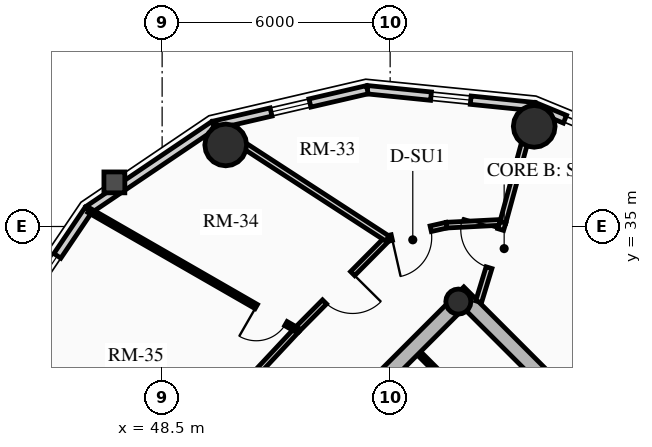
"""IFC4 building model, lengths in metres.
Left out: names, types, materials, properties, quantities, classifications, styles, units other than length and angle.
Written with IfcOpenShell. Run it as: python <this file> out.ifc"""

import sys

from ifc_helpers import new_model, si_unit, direction, frame, frame_2d, origin, origin_2d, place, context, subcontext, project, spatial, rectangle, circle, hollow_circle, extrude, source, transform, mapped, element, fill, save


model = new_model("IFC4")
c1 = context("Model", 3, precision=1e-05, world=origin(), true_north=direction((0.0, 1.0)))
c2 = subcontext(c1, "Body", "Model", "MODEL_VIEW")
j1 = project(units=[si_unit("LENGTHUNIT", "METRE"), si_unit("PLANEANGLEUNIT", "RADIAN")], contexts=[c1])
p1 = place(None, origin())
s1 = spatial("IfcSite", under=j1, at=p1, CompositionType="ELEMENT")
p2 = place(p1, origin())
s2 = spatial("IfcBuilding", under=s1, at=p2, CompositionType="ELEMENT")
p3 = place(p2, frame((0.0, 0.0, 211.21)))
s3 = spatial("IfcBuildingStorey", under=s2, at=p3, CompositionType="ELEMENT", Elevation=211.21)
p4 = place(p3, frame((66.268, 23.298, 0.0), z_axis=(0.0, 0.0, 1.0), x_axis=(-0.707106781187, 0.707106781187, 0.0)))
e1 = element("IfcWall", 1, at=p4, inside=s3, PredefinedType="SHEAR", context=c2, shape_type="SweptSolid", body=[
    extrude(rectangle(XDim=14.1, YDim=0.4, at=frame_2d((7.05, 0.0))), origin(), (0.0, 0.0, 1.0), 2.91),
])
p5 = place(p3, frame((48.873, 25.561, 0.0), z_axis=(0.0, 0.0, 1.0), x_axis=(0.707106781187, 0.707106781187, 0.0)))
e2 = element("IfcWall", 2, at=p5, inside=s3, PredefinedType="SHEAR", context=c2, shape_type="SweptSolid", body=[
    extrude(rectangle(XDim=10.7, YDim=0.4, at=frame_2d((5.35, 0.0))), origin(), (0.0, 0.0, 1.0), 2.91),
])
m1 = source(origin(), c2, "Body", "SweptSolid", [
    extrude(rectangle(XDim=1.5, YDim=2.02, at=frame_2d((0.75, 1.01))), frame((0.0, 0.21, 0.0), z_axis=(0.0, -1.0, 0.0), x_axis=(1.0, 0.0, 0.0)), (0.0, 0.0, 1.0), 0.42),
])
p6 = place(p5, frame((4.6, 0.0, 0.0)))
e3 = element("IfcOpeningElement", 3, at=p6, cuts=e2, PredefinedType="OPENING", context=c2, shape_type="MappedRepresentation", body=[
    mapped(m1, transform((0.0, 0.0, 0.0), x_axis=(1.0, 0.0, 0.0), y_axis=(0.0, 1.0, 0.0), z_axis=(0.0, 0.0, 1.0), scale=1.0)),
])
p7 = place(p3, frame((56.294, 33.024, 0.0), z_axis=(0.0, 0.0, 1.0), x_axis=(0.707106781187, 0.707106781187, 0.0)))
e4 = element("IfcColumn", 4, at=p7, inside=s3, PredefinedType="COLUMN", context=c2, shape_type="SweptSolid", body=[
    extrude(hollow_circle(Radius=0.33, WallThickness=0.025, at=origin_2d()), origin(), (0.0, 0.0, 1.0), 2.91),
])
for number, where, z_axis, x_axis in (
    (5, (58.291, 37.635, 0.0), (0.0, 0.0, 1.0), (1.0, 0.0, 0.0)),
    (6, (50.173, 37.146, 0.0), (0.0, 0.0, 1.0), (1.0, 0.0, 0.0)),
):
    element("IfcColumn", number, at=place(p3, frame(where, z_axis=z_axis, x_axis=x_axis)), inside=s3, PredefinedType="USERDEFINED", context=c2, shape_type="SweptSolid", body=[
        extrude(circle(Radius=0.55, at=origin_2d()), origin(), (0.0, 0.0, 1.0), 2.91),
    ])
p8 = place(p3, frame((58.295, 38.155, 0.0), z_axis=(0.0, 0.0, 1.0), x_axis=(0.924515260676, -0.381145028536, 0.0)))
e7 = element("IfcWall", 7, at=p8, inside=s3, PredefinedType="SOLIDWALL", context=c2, shape_type="SweptSolid", body=[
    extrude(rectangle(XDim=0.87, YDim=0.22, at=frame_2d((0.435, 0.0))), origin(), (0.0, 0.0, 1.0), 2.322),
])
p9 = place(p3, frame((53.9, 38.599, 0.0), z_axis=(0.0, 0.0, 1.0), x_axis=(0.994929930991, -0.100570534541, 0.0)))
e8 = element("IfcWall", 8, at=p9, inside=s3, PredefinedType="SOLIDWALL", context=c2, shape_type="SweptSolid", body=[
    extrude(rectangle(XDim=4.418, YDim=0.22, at=frame_2d((2.209, 0.0))), origin(), (0.0, 0.0, 1.0), 2.322),
])
m2 = source(origin(), c2, "Body", "SweptSolid", [
    extrude(rectangle(XDim=1.05, YDim=1.3, at=frame_2d((0.525, 0.65))), frame((0.0, 0.12, 0.0), z_axis=(0.0, -1.0, 0.0), x_axis=(1.0, 0.0, 0.0)), (0.0, 0.0, 1.0), 0.24),
])
p10 = place(p9, frame((1.684, 0.0, 0.65)))
e9 = element("IfcOpeningElement", 9, at=p10, cuts=e8, PredefinedType="OPENING", context=c2, shape_type="MappedRepresentation", body=[
    mapped(m2, transform((0.0, 0.0, 0.0), x_axis=(1.0, 0.0, 0.0), y_axis=(0.0, 1.0, 0.0), z_axis=(0.0, 0.0, 1.0), scale=1.0)),
])
p11 = place(p3, frame((49.856, 37.663, 0.0), z_axis=(0.0, 0.0, 1.0), x_axis=(0.974249228678, 0.225473813158, 0.0)))
e10 = element("IfcWall", 10, at=p11, inside=s3, PredefinedType="SOLIDWALL", context=c2, shape_type="SweptSolid", body=[
    extrude(rectangle(XDim=4.15, YDim=0.22, at=frame_2d((2.075, 0.0))), origin(), (0.0, 0.0, 1.0), 2.322),
])
p12 = place(p11, frame((1.55, 0.0, 0.65)))
e11 = element("IfcOpeningElement", 11, at=p12, cuts=e10, PredefinedType="OPENING", context=c2, shape_type="MappedRepresentation", body=[
    mapped(m2, transform((0.0, 0.0, 0.0), x_axis=(1.0, 0.0, 0.0), y_axis=(0.0, 1.0, 0.0), z_axis=(0.0, 0.0, 1.0), scale=1.0)),
])
p13 = place(p3, frame((46.561, 35.439, 0.0), z_axis=(0.0, 0.0, 1.0), x_axis=(0.828833723692, 0.559495003079, 0.0)))
e12 = element("IfcWall", 12, at=p13, inside=s3, PredefinedType="SOLIDWALL", context=c2, shape_type="SweptSolid", body=[
    extrude(rectangle(XDim=3.976, YDim=0.22, at=frame_2d((1.988, 0.0))), origin(), (0.0, 0.0, 1.0), 2.322),
])
p14 = place(p3, frame((44.337, 32.144, 0.0), z_axis=(0.0, 0.0, 1.0), x_axis=(0.559495003079, 0.828833723692, 0.0)))
e13 = element("IfcWall", 13, at=p14, inside=s3, PredefinedType="SOLIDWALL", context=c2, shape_type="SweptSolid", body=[
    extrude(rectangle(XDim=3.976, YDim=0.22, at=frame_2d((1.988, 0.0))), origin(), (0.0, 0.0, 1.0), 2.322),
])
p15 = place(p14, frame((1.463, 0.0, 0.65)))
e14 = element("IfcOpeningElement", 14, at=p15, cuts=e13, PredefinedType="OPENING", context=c2, shape_type="MappedRepresentation", body=[
    mapped(m2, transform((0.0, 0.0, 0.0), x_axis=(1.0, 0.0, 0.0), y_axis=(0.0, 1.0, 0.0), z_axis=(0.0, 0.0, 1.0), scale=1.0)),
])
p16 = place(p3, frame((57.981, 28.941, 0.0), z_axis=(0.0, 0.0, 1.0), x_axis=(-0.707074823725, 0.707138737204, 0.0)))
e15 = element("IfcWall", 15, at=p16, inside=s3, PredefinedType="PARTITIONING", context=c2, shape_type="SweptSolid", body=[
    extrude(rectangle(XDim=3.82, YDim=0.125, at=frame_2d((1.91, 0.0))), origin(), (0.0, 0.0, 1.0), 2.685),
])
m3 = source(origin(), c2, "Body", "SweptSolid", [
    extrude(rectangle(XDim=0.9, YDim=2.005, at=frame_2d((0.45, 1.002))), frame((0.0, 0.073, 0.0), z_axis=(0.0, -1.0, 0.0), x_axis=(1.0, 0.0, 0.0)), (0.0, 0.0, 1.0), 0.145),
])
p17 = place(p16, frame((1.45, 0.0, 0.0)))
e16 = element("IfcOpeningElement", 16, at=p17, cuts=e15, PredefinedType="OPENING", context=c2, shape_type="MappedRepresentation", body=[
    mapped(m3, transform((0.0, 0.0, 0.0), x_axis=(1.0, 0.0, 0.0), y_axis=(0.0, 1.0, 0.0), z_axis=(0.0, 0.0, 1.0), scale=1.0)),
])
p18 = place(p3, frame((57.467, 35.111, 0.0), z_axis=(0.0, 0.0, 1.0), x_axis=(-0.998691757323, -0.051134859488, 0.0)))
e17 = element("IfcWall", 17, at=p18, inside=s3, PredefinedType="PARTITIONING", context=c2, shape_type="SweptSolid", body=[
    extrude(rectangle(XDim=1.485, YDim=0.15, at=frame_2d((0.742, 0.0))), origin(), (0.0, 0.0, 1.0), 2.322),
])
p19 = place(p3, frame((55.984, 35.035, 0.0), z_axis=(0.0, 0.0, 1.0), x_axis=(-0.975290305708, -0.22092718165, 0.0)))
e18 = element("IfcWall", 18, at=p19, inside=s3, PredefinedType="PARTITIONING", context=c2, shape_type="SweptSolid", body=[
    extrude(rectangle(XDim=1.597, YDim=0.15, at=frame_2d((0.798, 0.0))), origin(), (0.0, 0.0, 1.0), 2.255),
])
m4 = source(origin(), c2, "Body", "SweptSolid", [
    extrude(rectangle(XDim=1.05, YDim=2.015, at=frame_2d((0.525, 1.007))), frame((0.0, 0.085, 0.0), z_axis=(0.0, -1.0, 0.0), x_axis=(1.0, 0.0, 0.0)), (0.0, 0.0, 1.0), 0.17),
])
p20 = place(p19, frame((0.427, 0.0, 0.0)))
e19 = element("IfcOpeningElement", 19, at=p20, cuts=e18, PredefinedType="OPENING", context=c2, shape_type="MappedRepresentation", body=[
    mapped(m4, transform((0.0, 0.0, 0.0), x_axis=(1.0, 0.0, 0.0), y_axis=(0.0, 1.0, 0.0), z_axis=(0.0, 0.0, 1.0), scale=1.0)),
])
p21 = place(p3, frame((54.427, 34.683, 0.0), z_axis=(0.0, 0.0, 1.0), x_axis=(-0.704178989986, -0.710022499687, 0.0)))
e20 = element("IfcWall", 20, at=p21, inside=s3, PredefinedType="PARTITIONING", context=c2, shape_type="SweptSolid", body=[
    extrude(rectangle(XDim=3.384, YDim=0.15, at=frame_2d((1.692, 0.0))), origin(), (0.0, 0.0, 1.0), 2.322),
])
p22 = place(p21, frame((1.298, 0.0, 0.0)))
e21 = element("IfcOpeningElement", 21, at=p22, cuts=e20, PredefinedType="OPENING", context=c2, shape_type="MappedRepresentation", body=[
    mapped(m4, transform((0.0, 0.0, 0.0), x_axis=(1.0, 0.0, 0.0), y_axis=(0.0, 1.0, 0.0), z_axis=(0.0, 0.0, 1.0), scale=1.0)),
])
p23 = place(p3, frame((52.043, 32.28, 0.0), z_axis=(0.0, 0.0, 1.0), x_axis=(-0.682606081633, -0.730786519661, 0.0)))
e22 = element("IfcWall", 22, at=p23, inside=s3, PredefinedType="PARTITIONING", context=c2, shape_type="SweptSolid", body=[
    extrude(rectangle(XDim=6.527, YDim=0.15, at=frame_2d((3.263, 0.0))), origin(), (0.0, 0.0, 1.0), 2.255),
])
p24 = place(p3, frame((57.467, 35.111, 0.0), z_axis=(0.0, 0.0, 1.0), x_axis=(0.263354670488, 0.964699081337, 0.0)))
e23 = element("IfcWall", 23, at=p24, inside=s3, PredefinedType="PARTITIONING", context=c2, shape_type="SweptSolid", body=[
    extrude(rectangle(XDim=3.134, YDim=0.16, at=frame_2d((1.567, 0.0))), origin(), (0.0, 0.0, 1.0), 2.322),
])
p25 = place(p3, frame((54.427, 34.683, 0.0), z_axis=(0.0, 0.0, 1.0), x_axis=(-0.83860663594, 0.544737469023, 0.0)))
e24 = element("IfcWall", 24, at=p25, inside=s3, PredefinedType="PARTITIONING", context=c2, shape_type="SweptSolid", body=[
    extrude(rectangle(XDim=5.439, YDim=0.16, at=frame_2d((2.72, 0.0))), origin(), (0.0, 0.0, 1.0), 2.322),
])
p26 = place(p3, frame((47.588, 27.51, 0.0), z_axis=(0.0, 0.0, 1.0), x_axis=(-0.573073195236, 0.819504187239, 0.0)))
e25 = element("IfcWall", 25, at=p26, inside=s3, PredefinedType="PARTITIONING", context=c2, shape_type="SweptSolid", body=[
    extrude(rectangle(XDim=5.643, YDim=0.16, at=frame_2d((2.822, 0.0))), origin(), (0.0, 0.0, 1.0), 2.322),
])
p27 = place(p3, frame((56.828, 33.021, 0.0), z_axis=(0.0, 0.0, 1.0), x_axis=(0.292139093972, 0.956375841274, 0.0)))
e26 = element("IfcWall", 26, at=p27, inside=s3, PredefinedType="PARTITIONING", context=c2, shape_type="SweptSolid", body=[
    extrude(rectangle(XDim=2.186, YDim=0.16, at=frame_2d((1.093, 0.0))), origin(), (0.0, 0.0, 1.0), 2.255),
])
m5 = source(origin(), c2, "Body", "SweptSolid", [
    extrude(rectangle(XDim=1.05, YDim=2.015, at=frame_2d((0.525, 1.007))), frame((0.0, 0.09, 0.0), z_axis=(0.0, -1.0, 0.0), x_axis=(1.0, 0.0, 0.0)), (0.0, 0.0, 1.0), 0.18),
])
p28 = place(p27, frame((0.936, 0.0, 0.0)))
e27 = element("IfcOpeningElement", 27, at=p28, cuts=e26, PredefinedType="OPENING", context=c2, shape_type="MappedRepresentation", body=[
    mapped(m5, transform((0.0, 0.0, 0.0), x_axis=(1.0, 0.0, 0.0), y_axis=(0.0, 1.0, 0.0), z_axis=(0.0, 0.0, 1.0), scale=1.0)),
])
p29 = place(p3, frame((52.043, 32.28, 0.0), z_axis=(0.0, 0.0, 1.0), x_axis=(-0.866853616581, 0.498562741709, 0.0)))
e28 = element("IfcWall", 28, at=p29, inside=s3, PredefinedType="PARTITIONING", context=c2, shape_type="SweptSolid", body=[
    extrude(rectangle(XDim=6.308, YDim=0.125, at=frame_2d((3.154, 0.0))), origin(), (0.0, 0.0, 1.0), 2.322),
])
p30 = place(p29, frame((0.33, 0.0, 0.0)))
e29 = element("IfcOpeningElement", 29, at=p30, cuts=e28, PredefinedType="OPENING", context=c2, shape_type="MappedRepresentation", body=[
    mapped(m3, transform((0.0, 0.0, 0.0), x_axis=(1.0, 0.0, 0.0), y_axis=(0.0, 1.0, 0.0), z_axis=(0.0, 0.0, 1.0), scale=1.0)),
])
m6 = source(origin(), c2, "Body", "SweptSolid", [
    extrude(rectangle(XDim=1.05, YDim=1.3, at=frame_2d((0.525, 0.65))), frame((0.0, 0.03, 0.0), z_axis=(0.0, -1.0, 0.0), x_axis=(1.0, 0.0, 0.0)), (0.0, 0.0, 1.0), 0.06),
])
p31 = place(p10, origin())
e30 = element("IfcWindow", 30, at=p31, inside=s3, PartitioningType="SINGLE_PANEL", PredefinedType="WINDOW", context=c2, shape_type="MappedRepresentation", body=[
    mapped(m6, transform((0.0, 0.0, 0.0), x_axis=(1.0, 0.0, 0.0), y_axis=(0.0, 1.0, 0.0), z_axis=(0.0, 0.0, 1.0), scale=1.0)),
])
fill(e9, e30)
p32 = place(p12, origin())
e31 = element("IfcWindow", 31, at=p32, inside=s3, PartitioningType="SINGLE_PANEL", PredefinedType="WINDOW", context=c2, shape_type="MappedRepresentation", body=[
    mapped(m6, transform((0.0, 0.0, 0.0), x_axis=(1.0, 0.0, 0.0), y_axis=(0.0, 1.0, 0.0), z_axis=(0.0, 0.0, 1.0), scale=1.0)),
])
fill(e11, e31)
p33 = place(p15, origin())
e32 = element("IfcWindow", 32, at=p33, inside=s3, PartitioningType="SINGLE_PANEL", PredefinedType="WINDOW", context=c2, shape_type="MappedRepresentation", body=[
    mapped(m6, transform((0.0, 0.0, 0.0), x_axis=(1.0, 0.0, 0.0), y_axis=(0.0, 1.0, 0.0), z_axis=(0.0, 0.0, 1.0), scale=1.0)),
])
fill(e14, e32)
m7 = source(origin(), c2, "Body", "SweptSolid", [
    extrude(rectangle(XDim=1.05, YDim=2.015, at=frame_2d((0.525, 1.007))), frame((0.0, 0.025, 0.0), z_axis=(0.0, -1.0, 0.0), x_axis=(1.0, 0.0, 0.0)), (0.0, 0.0, 1.0), 0.05),
])
p34 = place(p28, origin())
e33 = element("IfcDoor", 33, at=p34, inside=s3, OperationType="SINGLE_SWING_RIGHT", PredefinedType="DOOR", context=c2, shape_type="MappedRepresentation", body=[
    mapped(m7, transform((0.0, 0.0, 0.0), x_axis=(1.0, 0.0, 0.0), y_axis=(0.0, 1.0, 0.0), z_axis=(0.0, 0.0, 1.0), scale=1.0)),
])
fill(e27, e33)
p35 = place(p20, origin())
e34 = element("IfcDoor", 34, at=p35, inside=s3, OperationType="SINGLE_SWING_RIGHT", PredefinedType="DOOR", context=c2, shape_type="MappedRepresentation", body=[
    mapped(m7, transform((0.0, 0.0, 0.0), x_axis=(1.0, 0.0, 0.0), y_axis=(0.0, 1.0, 0.0), z_axis=(0.0, 0.0, 1.0), scale=1.0)),
])
fill(e19, e34)
p36 = place(p22, origin())
e35 = element("IfcDoor", 35, at=p36, inside=s3, OperationType="SINGLE_SWING_LEFT", PredefinedType="DOOR", context=c2, shape_type="MappedRepresentation", body=[
    mapped(m7, transform((0.0, 0.0, 0.0), x_axis=(1.0, 0.0, 0.0), y_axis=(0.0, 1.0, 0.0), z_axis=(0.0, 0.0, 1.0), scale=1.0)),
])
fill(e21, e35)
m8 = source(origin(), c2, "Body", "SweptSolid", [
    extrude(rectangle(XDim=0.9, YDim=2.005, at=frame_2d((0.45, 1.002))), frame((0.0, 0.025, 0.0), z_axis=(0.0, -1.0, 0.0), x_axis=(1.0, 0.0, 0.0)), (0.0, 0.0, 1.0), 0.05),
])
p37 = place(p30, origin())
e36 = element("IfcDoor", 36, at=p37, inside=s3, OperationType="SINGLE_SWING_RIGHT", PredefinedType="DOOR", context=c2, shape_type="MappedRepresentation", body=[
    mapped(m8, transform((0.0, 0.0, 0.0), x_axis=(1.0, 0.0, 0.0), y_axis=(0.0, 1.0, 0.0), z_axis=(0.0, 0.0, 1.0), scale=1.0)),
])
fill(e29, e36)
save(model, sys.argv[1])
